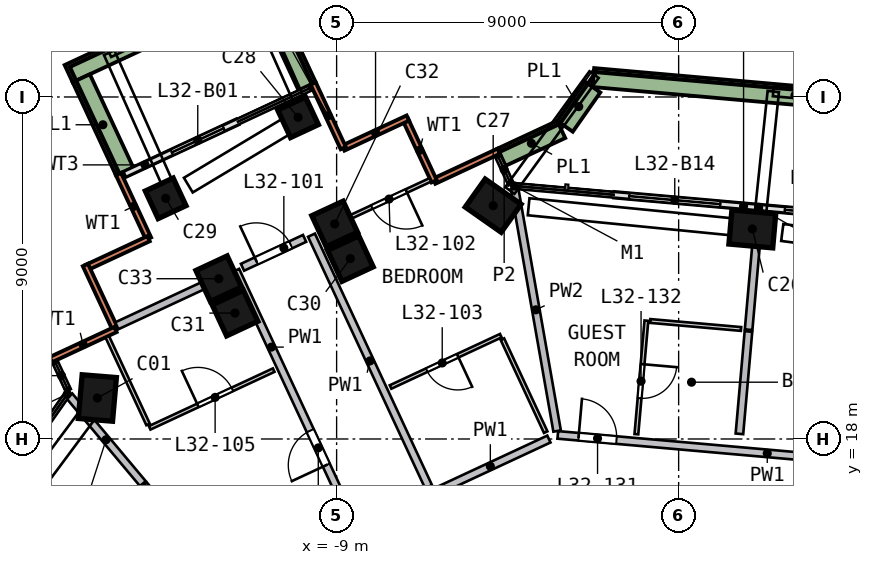
"""IFC4 building model, lengths in metres.
Left out: names, types, materials, properties, quantities, classifications, styles, units other than length and angle.
Written with IfcOpenShell. Run it as: python <this file> out.ifc"""

import sys

from ifc_helpers import new_model, si_unit, direction, frame, frame_2d, origin, origin_2d, place, context, subcontext, project, spatial, rectangle, extrude, element, fill, save


model = new_model("IFC4")
c1 = context("Model", 3, precision=1e-05, world=origin(), true_north=direction((0.0, 1.0)))
c2 = subcontext(c1, "Body", "Model", "MODEL_VIEW")
j1 = project(units=[si_unit("LENGTHUNIT", "METRE"), si_unit("PLANEANGLEUNIT", "RADIAN")], contexts=[c1])
p1 = place(None, origin())
s1 = spatial("IfcSite", under=j1, at=p1, CompositionType="ELEMENT")
p2 = place(p1, origin())
s2 = spatial("IfcBuilding", under=s1, at=p2, CompositionType="ELEMENT")
p3 = place(p2, frame((0.0, 0.0, 136.5)))
s3 = spatial("IfcBuildingStorey", under=s2, at=p3, CompositionType="ELEMENT", Elevation=136.5)
p4 = place(p3, frame((-15.186, 19.167, 0.0), z_axis=(-0.090534241, -0.072974703, 0.993216111), x_axis=(0.080826173, 0.993483318, 0.080361852)))
e1 = element("IfcColumn", 1, at=p4, inside=s3, PredefinedType="COLUMN", context=c2, shape_type="SweptSolid", body=[
    extrude(rectangle(XDim=1.15, YDim=0.9, at=origin_2d()), origin(), (0.0, 0.0, 1.0), 3.212),
])
p5 = place(p3, frame((2.074, 23.517, 0.0), z_axis=(-0.111946178, 0.008897896, 0.993674434), x_axis=(-0.989847104, 0.087134884, -0.112295249)))
e2 = element("IfcColumn", 2, at=p5, inside=s3, PredefinedType="COLUMN", context=c2, shape_type="SweptSolid", body=[
    extrude(rectangle(XDim=1.15, YDim=0.9, at=origin_2d()), origin(), (0.0, 0.0, 1.0), 3.21),
])
p6 = place(p3, frame((-4.741, 24.168, 0.0), z_axis=(-0.114771355, -0.023486324, 0.993114258), x_axis=(0.81200493, -0.578118427, 0.080169053)))
e3 = element("IfcColumn", 3, at=p6, inside=s3, PredefinedType="COLUMN", context=c2, shape_type="SweptSolid", body=[
    extrude(rectangle(XDim=1.15, YDim=0.9, at=origin_2d()), origin(), (0.0, 0.0, 1.0), 3.212),
])
p7 = place(p3, frame((-9.864, 26.523, 0.0), z_axis=(-0.125441971, -0.047856036, 0.990946069), x_axis=(-0.897874634, -0.419390262, -0.133913967)))
e4 = element("IfcColumn", 4, at=p7, inside=s3, PredefinedType="COLUMN", context=c2, shape_type="SweptSolid", body=[
    extrude(rectangle(XDim=0.8, YDim=0.8, at=origin_2d()), origin(), (0.0, 0.0, 1.0), 3.219),
])
p8 = place(p3, frame((-13.359, 24.411, 0.0), z_axis=(-0.115238963, -0.064333535, 0.991252328), x_axis=(-0.899231632, -0.41720397, -0.131618079)))
e5 = element("IfcColumn", 5, at=p8, inside=s3, PredefinedType="COLUMN", context=c2, shape_type="SweptSolid", body=[
    extrude(rectangle(XDim=0.8, YDim=0.8, at=origin_2d()), origin(), (0.0, 0.0, 1.0), 3.218),
])
for number, where, z_axis, x_axis in (
    (6, (-8.508, 22.797, 0.0), (-0.108, -0.041, 0.993), (-0.421, 0.907, -0.008)),
    (7, (-11.551, 21.381, 0.0), (-0.101, -0.056, 0.993), (-0.423, 0.906, 0.008)),
):
    element("IfcColumn", number, at=place(p3, frame(where, z_axis=z_axis, x_axis=x_axis)), inside=s3, PredefinedType="COLUMN", context=c2, shape_type="SweptSolid", body=[
        extrude(rectangle(XDim=0.9, YDim=0.9, at=origin_2d()), origin(), (0.0, 0.0, 1.0), 3.211),
    ])
p9 = place(p3, frame((-8.915, 23.711, 0.0), z_axis=(-0.11229609, -0.043231715, 0.992733905), x_axis=(-0.42060935, 0.907205946, -0.008071364)))
e8 = element("IfcColumn", 8, at=p9, inside=s3, PredefinedType="COLUMN", context=c2, shape_type="SweptSolid", body=[
    extrude(rectangle(XDim=0.9, YDim=0.9, at=origin_2d()), origin(), (0.0, 0.0, 1.0), 3.213),
])
p10 = place(p3, frame((-11.973, 22.287, 0.0), z_axis=(-0.105459281, -0.057744275, 0.992745657), x_axis=(-0.422473526, 0.906341364, 0.007839138)))
e9 = element("IfcColumn", 9, at=p10, inside=s3, PredefinedType="COLUMN", context=c2, shape_type="SweptSolid", body=[
    extrude(rectangle(XDim=0.9, YDim=0.9, at=origin_2d()), origin(), (0.0, 0.0, 1.0), 3.213),
])
p11 = place(p3, frame((-4.734, 25.574, 0.0), z_axis=(0.0, 0.0, 1.0), x_axis=(-0.906601815, -0.421987144, 0.0)))
e10 = element("IfcWall", 10, at=p11, inside=s3, PredefinedType="SOLIDWALL", context=c2, shape_type="SweptSolid", body=[
    extrude(rectangle(XDim=1.875, YDim=0.15, at=frame_2d((0.938, 0.0))), origin(), (0.0, 0.0, 1.0), 3.19),
])
p12 = place(p3, frame((-6.434, 24.783, 0.0), z_axis=(0.0, 0.0, 1.0), x_axis=(-0.421971917, 0.906608902, 0.0)))
e11 = element("IfcWall", 11, at=p12, inside=s3, PredefinedType="SOLIDWALL", context=c2, shape_type="SweptSolid", body=[
    extrude(rectangle(XDim=1.8, YDim=0.15, at=frame_2d((0.9, 0.0))), origin(), (0.0, 0.0, 1.0), 3.19),
])
for number, where, z_axis, x_axis in (
    (12, (-7.125, 26.447, 0.0), (0.0, 0.0, 1.0), (-0.907, -0.422, 0.0)),
    (13, (-8.825, 25.655, 0.0), (0.0, 0.0, 1.0), (-0.422, 0.907, 0.0)),
    (14, (-14.739, 24.971, 0.0), (0.0, 0.0, 1.0), (0.422, -0.907, 0.0)),
):
    element("IfcWall", number, at=place(p3, frame(where, z_axis=z_axis, x_axis=x_axis)), inside=s3, PredefinedType="SOLIDWALL", context=c2, shape_type="SweptSolid", body=[
        extrude(rectangle(XDim=1.875, YDim=0.15, at=frame_2d((0.938, 0.0))), origin(), (0.0, 0.0, 1.0), 3.19),
    ])
p13 = place(p3, frame((-13.948, 23.271, 0.0), z_axis=(0.0, 0.0, 1.0), x_axis=(-0.906608902, -0.421971917, 0.0)))
e15 = element("IfcWall", 15, at=p13, inside=s3, PredefinedType="SOLIDWALL", context=c2, shape_type="SweptSolid", body=[
    extrude(rectangle(XDim=1.8, YDim=0.15, at=frame_2d((0.9, 0.0))), origin(), (0.0, 0.0, 1.0), 3.19),
])
for number, where, z_axis, x_axis in (
    (16, (-15.611, 22.58, 0.0), (0.0, 0.0, 1.0), (0.422, -0.907, 0.0)),
    (17, (-14.82, 20.88, 0.0), (0.0, 0.0, 1.0), (-0.907, -0.422, 0.0)),
):
    element("IfcWall", number, at=place(p3, frame(where, z_axis=z_axis, x_axis=x_axis)), inside=s3, PredefinedType="SOLIDWALL", context=c2, shape_type="SweptSolid", body=[
        extrude(rectangle(XDim=1.875, YDim=0.15, at=frame_2d((0.938, 0.0))), origin(), (0.0, 0.0, 1.0), 3.19),
    ])
p14 = place(p3, frame((-11.611, 26.344, 0.0), z_axis=(0.0, 0.0, 1.0), x_axis=(-0.906597869, -0.421995621, 0.0)))
e18 = element("IfcWall", 18, at=p14, inside=s3, PredefinedType="SOLIDWALL", context=c2, shape_type="SweptSolid", body=[
    extrude(rectangle(XDim=3.26, YDim=0.15, at=frame_2d((1.63, 0.0))), origin(), (0.0, 0.0, 1.0), 2.475),
])
p15 = place(p14, frame((0.4, 0.0, 0.0)))
e19 = element("IfcOpeningElement", 19, at=p15, cuts=e18, PredefinedType="OPENING", context=c2, shape_type="SweptSolid", body=[
    extrude(rectangle(XDim=1.5, YDim=2.4, at=frame_2d((0.75, 1.2))), frame((0.0, 0.085, 0.0), z_axis=(0.0, -1.0, 0.0), x_axis=(1.0, 0.0, 0.0)), (0.0, 0.0, 1.0), 0.17),
])
p16 = place(p3, frame((5.586, 23.784, 0.0), z_axis=(0.0, 0.0, 1.0), x_axis=(-0.996130393, 0.087887659, 0.0)))
e20 = element("IfcWall", 20, at=p16, inside=s3, PredefinedType="SOLIDWALL", context=c2, shape_type="SweptSolid", body=[
    extrude(rectangle(XDim=3.475, YDim=0.15, at=frame_2d((1.738, 0.0))), origin(), (0.0, 0.0, 1.0), 2.475),
])
p17 = place(p16, frame((0.4, 0.0, 0.0)))
e21 = element("IfcOpeningElement", 21, at=p17, cuts=e20, PredefinedType="OPENING", context=c2, shape_type="SweptSolid", body=[
    extrude(rectangle(XDim=2.4, YDim=2.4, at=frame_2d((1.2, 1.2))), frame((0.0, 0.085, 0.0), z_axis=(0.0, -1.0, 0.0), x_axis=(1.0, 0.0, 0.0)), (0.0, 0.0, 1.0), 0.17),
])
p18 = place(p3, frame((2.125, 24.09, 0.0), z_axis=(0.0, 0.0, 1.0), x_axis=(-0.996134275, 0.087843651, 0.0)))
e22 = element("IfcWall", 22, at=p18, inside=s3, PredefinedType="SOLIDWALL", context=c2, shape_type="SweptSolid", body=[
    extrude(rectangle(XDim=3.835, YDim=0.15, at=frame_2d((1.918, 0.0))), origin(), (0.0, 0.0, 1.0), 2.475),
])
p19 = place(p18, frame((1.035, 0.0, 0.0)))
e23 = element("IfcOpeningElement", 23, at=p19, cuts=e22, PredefinedType="OPENING", context=c2, shape_type="SweptSolid", body=[
    extrude(rectangle(XDim=2.4, YDim=2.4, at=frame_2d((1.2, 1.2))), frame((0.0, 0.085, 0.0), z_axis=(0.0, -1.0, 0.0), x_axis=(1.0, 0.0, 0.0)), (0.0, 0.0, 1.0), 0.17),
])
p20 = place(p3, frame((-9.776, 27.282, 0.0), z_axis=(0.0, 0.0, 1.0), x_axis=(-0.42203715, 0.906578537, 0.0)))
e24 = element("IfcWall", 24, at=p20, inside=s3, PredefinedType="SOLIDWALL", context=c2, shape_type="SweptSolid", body=[
    extrude(rectangle(XDim=3.199, YDim=0.5, at=frame_2d((1.6, 0.0))), origin(), (0.0, 0.0, 1.0), 0.7),
])
p21 = place(p3, frame((-11.247, 29.85, 0.0), z_axis=(0.0, 0.0, 1.0), x_axis=(-0.90659695, -0.421997595, 0.0)))
e25 = element("IfcWall", 25, at=p21, inside=s3, PredefinedType="SOLIDWALL", context=c2, shape_type="SweptSolid", body=[
    extrude(rectangle(XDim=5.3, YDim=0.5, at=frame_2d((2.65, 0.0))), origin(), (0.0, 0.0, 1.0), 0.7),
])
p22 = place(p3, frame((-15.72, 27.493, 0.0), z_axis=(0.0, 0.0, 1.0), x_axis=(0.421964209, -0.90661249, 0.0)))
e26 = element("IfcWall", 26, at=p22, inside=s3, PredefinedType="SOLIDWALL", context=c2, shape_type="SweptSolid", body=[
    extrude(rectangle(XDim=2.699, YDim=0.5, at=frame_2d((1.35, 0.0))), origin(), (0.0, 0.0, 1.0), 0.7),
])
p23 = place(p3, frame((8.367, 26.576, 0.0), z_axis=(0.0, 0.0, 1.0), x_axis=(-0.996131974, 0.087869731, 0.0)))
e27 = element("IfcWall", 27, at=p23, inside=s3, PredefinedType="SOLIDWALL", context=c2, shape_type="SweptSolid", body=[
    extrude(rectangle(XDim=10.653, YDim=0.5, at=frame_2d((5.326, 0.0))), origin(), (0.0, 0.0, 1.0), 0.7),
])
p24 = place(p3, frame((-2.266, 27.263, 0.0), z_axis=(0.0, 0.0, 1.0), x_axis=(-0.574098281, -0.818786397, 0.0)))
e28 = element("IfcWall", 28, at=p24, inside=s3, PredefinedType="SOLIDWALL", context=c2, shape_type="SweptSolid", body=[
    extrude(rectangle(XDim=1.262, YDim=0.5, at=frame_2d((0.631, 0.0))), origin(), (0.0, 0.0, 1.0), 0.7),
])
p25 = place(p3, frame((-3.09, 26.146, 0.0), z_axis=(0.0, 0.0, 1.0), x_axis=(-0.906625779, -0.421935656, 0.0)))
e29 = element("IfcWall", 29, at=p25, inside=s3, PredefinedType="SOLIDWALL", context=c2, shape_type="SweptSolid", body=[
    extrude(rectangle(XDim=1.731, YDim=0.5, at=frame_2d((0.866, 0.0))), origin(), (0.0, 0.0, 1.0), 0.7),
])
p26 = place(p3, frame((-11.476, 22.519, 0.0), z_axis=(0.0, 0.0, 1.0), x_axis=(0.906570442, 0.42205454, 0.0)))
e30 = element("IfcWall", 30, at=p26, inside=s3, PredefinedType="SOLIDWALL", context=c2, shape_type="SweptSolid", body=[
    extrude(rectangle(XDim=1.802, YDim=0.2, at=frame_2d((0.901, 0.0))), origin(), (0.0, 0.0, 1.0), 3.19),
])
p27 = place(p26, frame((0.4, 0.0, 0.0)))
e31 = element("IfcOpeningElement", 31, at=p27, cuts=e30, PredefinedType="OPENING", context=c2, shape_type="SweptSolid", body=[
    extrude(rectangle(XDim=1.0, YDim=2.1, at=frame_2d((0.5, 1.05))), frame((0.0, 0.11, 0.0), z_axis=(0.0, -1.0, 0.0), x_axis=(1.0, 0.0, 0.0)), (0.0, 0.0, 1.0), 0.22),
])
p28 = place(p3, frame((-8.491, 15.635, 0.0), z_axis=(0.0, 0.0, 1.0), x_axis=(-0.421999597, 0.906596018, 0.0)))
e32 = element("IfcWall", 32, at=p28, inside=s3, PredefinedType="SOLIDWALL", context=c2, shape_type="SweptSolid", body=[
    extrude(rectangle(XDim=7.5, YDim=0.2, at=frame_2d((3.75, 0.0))), origin(), (0.0, 0.0, 1.0), 3.19),
])
p29 = place(p28, frame((1.85, 0.0, 0.0)))
e33 = element("IfcOpeningElement", 33, at=p29, cuts=e32, PredefinedType="OPENING", context=c2, shape_type="SweptSolid", body=[
    extrude(rectangle(XDim=1.0, YDim=2.1, at=frame_2d((0.5, 1.05))), frame((0.0, 0.11, 0.0), z_axis=(0.0, -1.0, 0.0), x_axis=(1.0, 0.0, 0.0)), (0.0, 0.0, 1.0), 0.22),
])
p30 = place(p3, frame((-6.581, 16.745, 0.0), z_axis=(0.0, 0.0, 1.0), x_axis=(-0.421995458, 0.906597945, 0.0)))
e34 = element("IfcWall", 34, at=p30, inside=s3, PredefinedType="SOLIDWALL", context=c2, shape_type="SweptSolid", body=[
    extrude(rectangle(XDim=7.3, YDim=0.2, at=frame_2d((3.65, 0.0))), origin(), (0.0, 0.0, 1.0), 3.19),
])
p31 = place(p3, frame((-3.414, 17.999, 0.0), z_axis=(0.0, 0.0, 1.0), x_axis=(-0.906599112, -0.42199295, 0.0)))
e35 = element("IfcWall", 35, at=p31, inside=s3, PredefinedType="SOLIDWALL", context=c2, shape_type="SweptSolid", body=[
    extrude(rectangle(XDim=3.4, YDim=0.2, at=frame_2d((1.7, 0.0))), origin(), (0.0, 0.0, 1.0), 3.19),
])
p32 = place(p3, frame((-3.18, 18.108, 0.0), z_axis=(0.0, 0.0, 1.0), x_axis=(0.996134235, -0.087844097, 0.0)))
e36 = element("IfcWall", 36, at=p32, inside=s3, PredefinedType="SOLIDWALL", context=c2, shape_type="SweptSolid", body=[
    extrude(rectangle(XDim=9.316, YDim=0.2, at=frame_2d((4.658, 0.0))), origin(), (0.0, 0.0, 1.0), 3.19),
])
p33 = place(p32, frame((0.55, 0.0, 0.0)))
e37 = element("IfcOpeningElement", 37, at=p33, cuts=e36, PredefinedType="OPENING", context=c2, shape_type="SweptSolid", body=[
    extrude(rectangle(XDim=1.0, YDim=2.1, at=frame_2d((0.5, 1.05))), frame((0.0, 0.11, 0.0), z_axis=(0.0, -1.0, 0.0), x_axis=(1.0, 0.0, 0.0)), (0.0, 0.0, 1.0), 0.22),
])
p34 = place(p3, frame((-14.099, 16.826, 0.0), z_axis=(0.0, 0.0, 1.0), x_axis=(-0.642231449, 0.766510774, 0.0)))
e38 = element("IfcWall", 38, at=p34, inside=s3, PredefinedType="SOLIDWALL", context=c2, shape_type="SweptSolid", body=[
    extrude(rectangle(XDim=3.011, YDim=0.2, at=frame_2d((1.506, 0.0))), origin(), (0.0, 0.0, 1.0), 2.69),
])
p35 = place(p3, frame((-11.835, 22.352, 0.0), z_axis=(0.0, 0.0, 1.0), x_axis=(-0.906598898, -0.421993409, 0.0)))
e39 = element("IfcWall", 39, at=p35, inside=s3, PredefinedType="SOLIDWALL", context=c2, shape_type="SweptSolid", body=[
    extrude(rectangle(XDim=3.252, YDim=0.2, at=frame_2d((1.626, 0.0))), origin(), (0.0, 0.0, 1.0), 3.19),
])
p36 = place(p3, frame((-11.874, 14.171, 0.0), z_axis=(0.0, 0.0, 1.0), x_axis=(-0.642233473, 0.766509078, 0.0)))
e40 = element("IfcWall", 40, at=p36, inside=s3, PredefinedType="SOLIDWALL", context=c2, shape_type="SweptSolid", body=[
    extrude(rectangle(XDim=3.418, YDim=0.2, at=frame_2d((1.709, 0.0))), origin(), (0.0, 0.0, 1.0), 3.19),
])
p37 = place(p3, frame((-4.318, 24.588, 0.0), z_axis=(0.0, 0.0, 1.0), x_axis=(0.172970158, -0.984927066, 0.0)))
e41 = element("IfcWall", 41, at=p37, inside=s3, PredefinedType="SOLIDWALL", context=c2, shape_type="SweptSolid", body=[
    extrude(rectangle(XDim=6.476, YDim=0.2, at=frame_2d((3.238, 0.0))), origin(), (0.0, 0.0, 1.0), 3.19),
])
p38 = place(p3, frame((1.599, 18.135, 0.0), z_axis=(0.0, 0.0, 1.0), x_axis=(0.087825319, 0.996135891, 0.0)))
e42 = element("IfcWall", 42, at=p38, inside=s3, PredefinedType="SOLIDWALL", context=c2, shape_type="SweptSolid", body=[
    extrude(rectangle(XDim=2.705, YDim=0.2, at=frame_2d((1.353, 0.0))), origin(), (0.0, 0.0, 1.0), 3.19),
])
p39 = place(p3, frame((1.841, 20.875, 0.0), z_axis=(0.0, 0.0, 1.0), x_axis=(0.087832778, 0.996135233, 0.0)))
e43 = element("IfcWall", 43, at=p39, inside=s3, PredefinedType="SOLIDWALL", context=c2, shape_type="SweptSolid", body=[
    extrude(rectangle(XDim=3.152, YDim=0.2, at=frame_2d((1.576, 0.0))), origin(), (0.0, 0.0, 1.0), 3.19),
])
p40 = place(p3, frame((-13.962, 18.384, 0.0), z_axis=(0.0, 0.0, 1.0), x_axis=(-0.421952243, 0.906618059, 0.0)))
e44 = element("IfcWall", 44, at=p40, inside=s3, PredefinedType="PARTITIONING", context=c2, shape_type="SweptSolid", body=[
    extrude(rectangle(XDim=2.55, YDim=0.1, at=frame_2d((1.275, 0.0))), origin(), (0.0, 0.0, 1.0), 3.19),
])
p41 = place(p3, frame((-13.919, 18.293, 0.0), z_axis=(0.0, 0.0, 1.0), x_axis=(0.906608902, 0.421971917, 0.0)))
e45 = element("IfcWall", 45, at=p41, inside=s3, PredefinedType="PARTITIONING", context=c2, shape_type="SweptSolid", body=[
    extrude(rectangle(XDim=3.6, YDim=0.1, at=frame_2d((1.8, 0.0))), origin(), (0.0, 0.0, 1.0), 3.19),
])
p42 = place(p41, frame((1.4, 0.0, 0.0)))
e46 = element("IfcOpeningElement", 46, at=p42, cuts=e45, PredefinedType="OPENING", context=c2, shape_type="SweptSolid", body=[
    extrude(rectangle(XDim=1.0, YDim=2.1, at=frame_2d((0.5, 1.05))), frame((0.0, 0.06, 0.0), z_axis=(0.0, -1.0, 0.0), x_axis=(1.0, 0.0, 0.0)), (0.0, 0.0, 1.0), 0.12),
])
p43 = place(p3, frame((-6.532, 24.82, 0.0), z_axis=(0.0, 0.0, 1.0), x_axis=(-0.906598898, -0.421993409, 0.0)))
e47 = element("IfcWall", 47, at=p43, inside=s3, PredefinedType="PARTITIONING", context=c2, shape_type="SweptSolid", body=[
    extrude(rectangle(XDim=3.252, YDim=0.1, at=frame_2d((1.626, 0.0))), origin(), (0.0, 0.0, 1.0), 3.19),
])
p44 = place(p43, frame((0.7, 0.0, 0.0)))
e48 = element("IfcOpeningElement", 48, at=p44, cuts=e47, PredefinedType="OPENING", context=c2, shape_type="SweptSolid", body=[
    extrude(rectangle(XDim=1.0, YDim=2.1, at=frame_2d((0.5, 1.05))), frame((0.0, 0.06, 0.0), z_axis=(0.0, -1.0, 0.0), x_axis=(1.0, 0.0, 0.0)), (0.0, 0.0, 1.0), 0.12),
])
p45 = place(p3, frame((-4.68, 20.719, 0.0), z_axis=(0.0, 0.0, 1.0), x_axis=(-0.906603701, -0.421983091, 0.0)))
e49 = element("IfcWall", 49, at=p45, inside=s3, PredefinedType="PARTITIONING", context=c2, shape_type="SweptSolid", body=[
    extrude(rectangle(XDim=3.2, YDim=0.1, at=frame_2d((1.6, 0.0))), origin(), (0.0, 0.0, 1.0), 3.19),
])
p46 = place(p45, frame((1.25, 0.0, 0.0)))
e50 = element("IfcOpeningElement", 50, at=p46, cuts=e49, PredefinedType="OPENING", context=c2, shape_type="SweptSolid", body=[
    extrude(rectangle(XDim=0.9, YDim=2.1, at=frame_2d((0.45, 1.05))), frame((0.0, 0.06, 0.0), z_axis=(0.0, -1.0, 0.0), x_axis=(1.0, 0.0, 0.0)), (0.0, 0.0, 1.0), 0.12),
])
p47 = place(p3, frame((-3.498, 18.18, 0.0), z_axis=(0.0, 0.0, 1.0), x_axis=(-0.422009078, 0.906591605, 0.0)))
e51 = element("IfcWall", 51, at=p47, inside=s3, PredefinedType="PARTITIONING", context=c2, shape_type="SweptSolid", body=[
    extrude(rectangle(XDim=2.7, YDim=0.1, at=frame_2d((1.35, 0.0))), origin(), (0.0, 0.0, 1.0), 3.19),
])
p48 = place(p3, frame((-0.848, 21.115, 0.0), z_axis=(0.0, 0.0, 1.0), x_axis=(-0.087813055, -0.996136972, 0.0)))
e52 = element("IfcWall", 52, at=p48, inside=s3, PredefinedType="PARTITIONING", context=c2, shape_type="SweptSolid", body=[
    extrude(rectangle(XDim=3.0, YDim=0.1, at=frame_2d((1.5, 0.0))), origin(), (0.0, 0.0, 1.0), 3.19),
])
p49 = place(p48, frame((1.15, 0.0, 0.0)))
e53 = element("IfcOpeningElement", 53, at=p49, cuts=e52, PredefinedType="OPENING", context=c2, shape_type="SweptSolid", body=[
    extrude(rectangle(XDim=0.9, YDim=2.1, at=frame_2d((0.45, 1.05))), frame((0.0, 0.06, 0.0), z_axis=(0.0, -1.0, 0.0), x_axis=(1.0, 0.0, 0.0)), (0.0, 0.0, 1.0), 0.12),
])
p50 = place(p3, frame((-0.749, 21.106, 0.0), z_axis=(0.0, 0.0, 1.0), x_axis=(0.996139536, -0.08778397, 0.0)))
e54 = element("IfcWall", 54, at=p50, inside=s3, PredefinedType="PARTITIONING", context=c2, shape_type="SweptSolid", body=[
    extrude(rectangle(XDim=2.4, YDim=0.1, at=frame_2d((1.2, 0.0))), origin(), (0.0, 0.0, 1.0), 3.19),
])
p51 = place(p15, origin())
e55 = element("IfcDoor", 55, at=p51, inside=s3, OperationType="SLIDING_TO_RIGHT", PredefinedType="DOOR", context=c2, shape_type="SweptSolid", body=[
    extrude(rectangle(XDim=1.5, YDim=2.4, at=frame_2d((0.75, 1.2))), frame((0.0, 0.025, 0.0), z_axis=(0.0, -1.0, 0.0), x_axis=(1.0, 0.0, 0.0)), (0.0, 0.0, 1.0), 0.05),
])
fill(e19, e55)
p52 = place(p17, origin())
e56 = element("IfcDoor", 56, at=p52, inside=s3, OperationType="SLIDING_TO_RIGHT", PredefinedType="DOOR", context=c2, shape_type="SweptSolid", body=[
    extrude(rectangle(XDim=2.4, YDim=2.4, at=frame_2d((1.2, 1.2))), frame((0.0, 0.025, 0.0), z_axis=(0.0, -1.0, 0.0), x_axis=(1.0, 0.0, 0.0)), (0.0, 0.0, 1.0), 0.05),
])
fill(e21, e56)
p53 = place(p19, origin())
e57 = element("IfcDoor", 57, at=p53, inside=s3, OperationType="SLIDING_TO_LEFT", PredefinedType="DOOR", context=c2, shape_type="SweptSolid", body=[
    extrude(rectangle(XDim=2.4, YDim=2.4, at=frame_2d((1.2, 1.2))), frame((0.0, 0.025, 0.0), z_axis=(0.0, -1.0, 0.0), x_axis=(1.0, 0.0, 0.0)), (0.0, 0.0, 1.0), 0.05),
])
fill(e23, e57)
p54 = place(p27, origin())
e58 = element("IfcDoor", 58, at=p54, inside=s3, OperationType="SINGLE_SWING_LEFT", PredefinedType="DOOR", context=c2, shape_type="SweptSolid", body=[
    extrude(rectangle(XDim=1.0, YDim=2.1, at=frame_2d((0.5, 1.05))), frame((0.0, 0.025, 0.0), z_axis=(0.0, -1.0, 0.0), x_axis=(1.0, 0.0, 0.0)), (0.0, 0.0, 1.0), 0.05),
])
fill(e31, e58)
p55 = place(p44, origin())
e59 = element("IfcDoor", 59, at=p55, inside=s3, OperationType="SINGLE_SWING_LEFT", PredefinedType="DOOR", context=c2, shape_type="SweptSolid", body=[
    extrude(rectangle(XDim=1.0, YDim=2.1, at=frame_2d((0.5, 1.05))), frame((0.0, 0.025, 0.0), z_axis=(0.0, -1.0, 0.0), x_axis=(1.0, 0.0, 0.0)), (0.0, 0.0, 1.0), 0.05),
])
fill(e48, e59)
p56 = place(p46, origin())
e60 = element("IfcDoor", 60, at=p56, inside=s3, OperationType="SINGLE_SWING_LEFT", PredefinedType="DOOR", context=c2, shape_type="SweptSolid", body=[
    extrude(rectangle(XDim=0.9, YDim=2.1, at=frame_2d((0.45, 1.05))), frame((0.0, 0.025, 0.0), z_axis=(0.0, -1.0, 0.0), x_axis=(1.0, 0.0, 0.0)), (0.0, 0.0, 1.0), 0.05),
])
fill(e50, e60)
p57 = place(p29, origin())
e61 = element("IfcDoor", 61, at=p57, inside=s3, OperationType="SINGLE_SWING_LEFT", PredefinedType="DOOR", context=c2, shape_type="SweptSolid", body=[
    extrude(rectangle(XDim=1.0, YDim=2.1, at=frame_2d((0.5, 1.05))), frame((0.0, 0.025, 0.0), z_axis=(0.0, -1.0, 0.0), x_axis=(1.0, 0.0, 0.0)), (0.0, 0.0, 1.0), 0.05),
])
fill(e33, e61)
p58 = place(p42, origin())
e62 = element("IfcDoor", 62, at=p58, inside=s3, OperationType="SINGLE_SWING_LEFT", PredefinedType="DOOR", context=c2, shape_type="SweptSolid", body=[
    extrude(rectangle(XDim=1.0, YDim=2.1, at=frame_2d((0.5, 1.05))), frame((0.0, 0.025, 0.0), z_axis=(0.0, -1.0, 0.0), x_axis=(1.0, 0.0, 0.0)), (0.0, 0.0, 1.0), 0.05),
])
fill(e46, e62)
p59 = place(p33, origin())
e63 = element("IfcDoor", 63, at=p59, inside=s3, OperationType="SINGLE_SWING_LEFT", PredefinedType="DOOR", context=c2, shape_type="SweptSolid", body=[
    extrude(rectangle(XDim=1.0, YDim=2.1, at=frame_2d((0.5, 1.05))), frame((0.0, 0.025, 0.0), z_axis=(0.0, -1.0, 0.0), x_axis=(1.0, 0.0, 0.0)), (0.0, 0.0, 1.0), 0.05),
])
fill(e37, e63)
p60 = place(p49, origin())
e64 = element("IfcDoor", 64, at=p60, inside=s3, OperationType="SINGLE_SWING_LEFT", PredefinedType="DOOR", context=c2, shape_type="SweptSolid", body=[
    extrude(rectangle(XDim=0.9, YDim=2.1, at=frame_2d((0.45, 1.05))), frame((0.0, 0.025, 0.0), z_axis=(0.0, -1.0, 0.0), x_axis=(1.0, 0.0, 0.0)), (0.0, 0.0, 1.0), 0.05),
])
fill(e53, e64)
save(model, sys.argv[1])
